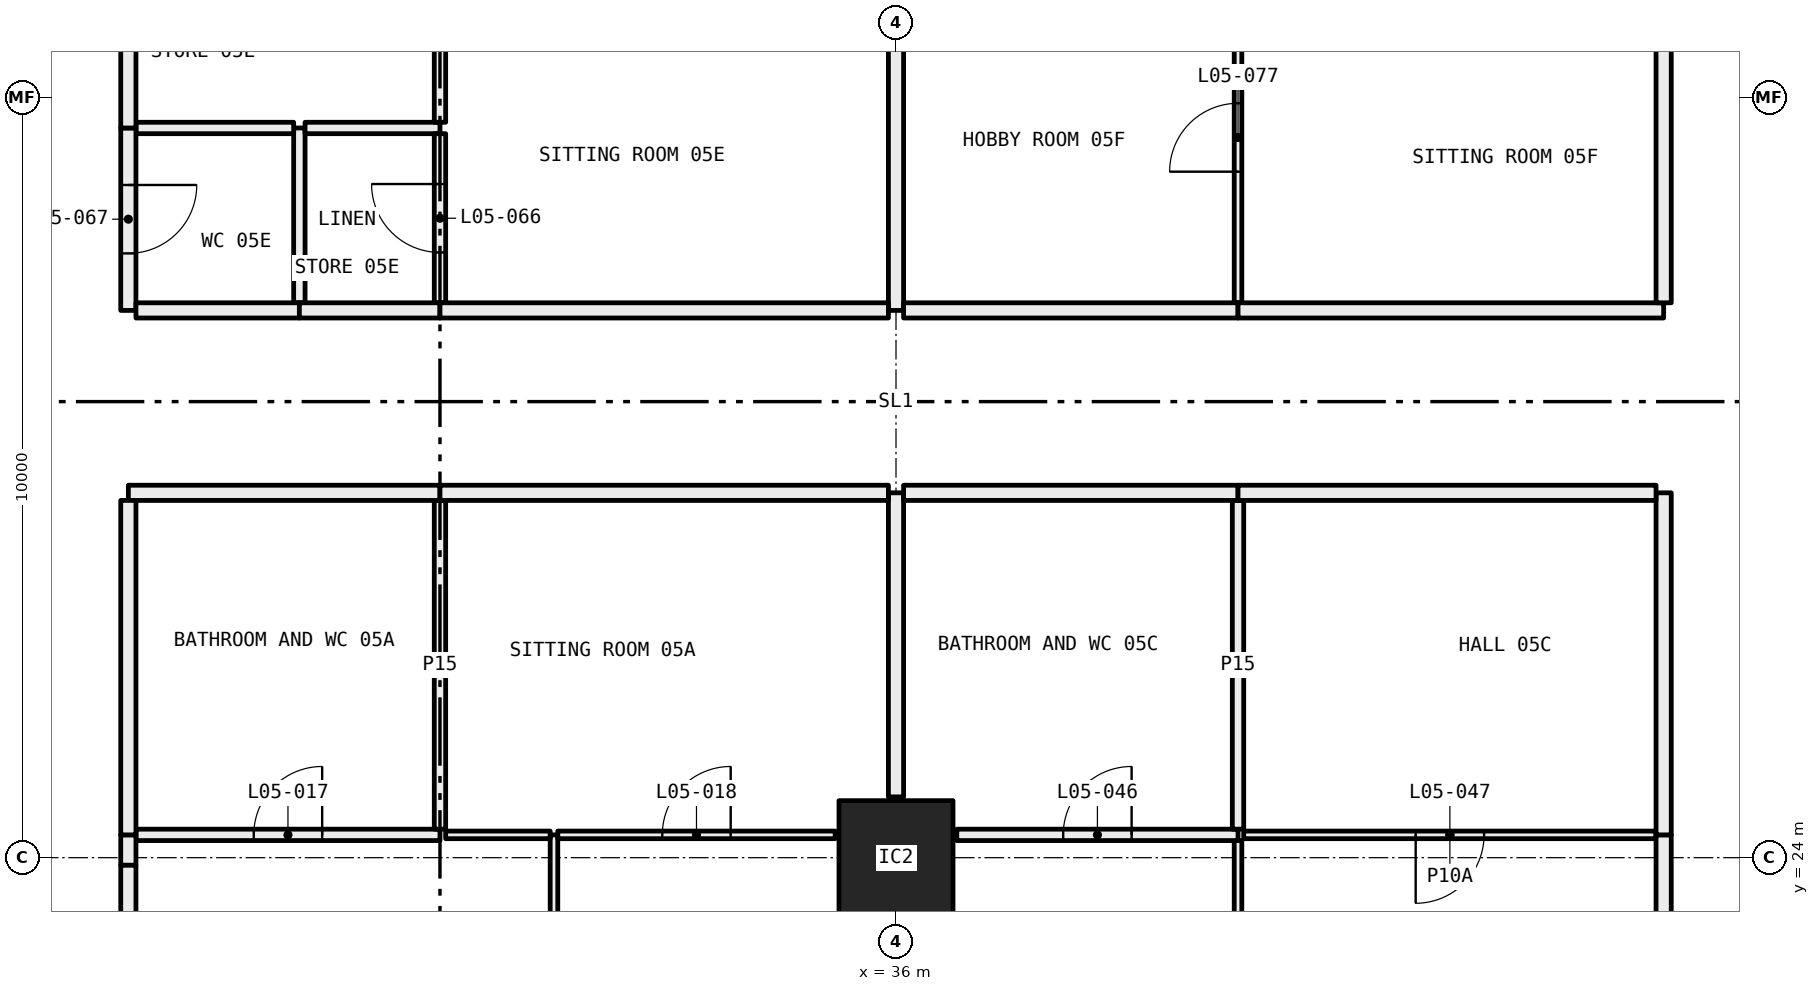
"""IFC4 building model, lengths in metres.
Left out: names, types, materials, properties, quantities, classifications, styles, units other than length and angle.
Written with IfcOpenShell. Run it as: python <this file> out.ifc"""

import sys

from ifc_helpers import new_model, si_unit, direction, frame, frame_2d, origin, origin_2d, place, context, subcontext, project, spatial, rectangle, hollow_rectangle, extrude, element, fill, save


model = new_model("IFC4")
c1 = context("Model", 3, precision=1e-05, world=origin(), true_north=direction((0.0, 1.0)))
c2 = subcontext(c1, "Body", "Model", "MODEL_VIEW")
j1 = project(units=[si_unit("LENGTHUNIT", "METRE"), si_unit("PLANEANGLEUNIT", "RADIAN")], contexts=[c1])
p1 = place(None, origin())
s1 = spatial("IfcSite", under=j1, at=p1, CompositionType="ELEMENT")
p2 = place(p1, origin())
s2 = spatial("IfcBuilding", under=s1, at=p2, CompositionType="ELEMENT")
p3 = place(p2, frame((0.0, 0.0, 30.0)))
s3 = spatial("IfcBuildingStorey", under=s2, at=p3, CompositionType="ELEMENT", Elevation=30.0)
p4 = place(p3, frame((36.0, 24.0, 0.0), z_axis=(0.0, 0.0, 1.0), x_axis=(1.0, 0.0, 0.0)))
e1 = element("IfcColumn", 1, at=p4, inside=s3, PredefinedType="COLUMN", context=c2, shape_type="SweptSolid", body=[
    extrude(hollow_rectangle(XDim=1.5, YDim=1.5, WallThickness=0.065, at=origin_2d()), origin(), (0.0, 0.0, 1.0), 3.05),
])
p5 = place(p3, frame((31.5, 18.05, 0.0), z_axis=(0.0, 0.0, 1.0), x_axis=(0.0, 1.0, 0.0)))
e2 = element("IfcWall", 2, at=p5, inside=s3, PredefinedType="PARTITIONING", context=c2, shape_type="SweptSolid", body=[
    extrude(rectangle(XDim=6.25, YDim=0.1, at=frame_2d((3.125, 0.0))), origin(), (0.0, 0.0, 1.0), 2.45),
])
p6 = place(p5, frame((2.675, 0.0, 0.0)))
e3 = element("IfcOpeningElement", 3, at=p6, cuts=e2, PredefinedType="OPENING", context=c2, shape_type="SweptSolid", body=[
    extrude(rectangle(XDim=0.9, YDim=2.1, at=frame_2d((0.45, 1.05))), frame((0.0, 0.06, 0.0), z_axis=(0.0, -1.0, 0.0), x_axis=(1.0, 0.0, 0.0)), (0.0, 0.0, 1.0), 0.12),
])
p7 = place(p3, frame((30.0, 24.3, 0.0), z_axis=(0.0, 0.0, 1.0), x_axis=(-1.0, 0.0, 0.0)))
e4 = element("IfcWall", 4, at=p7, inside=s3, PredefinedType="PARTITIONING", context=c2, shape_type="SweptSolid", body=[
    extrude(rectangle(XDim=4.0, YDim=0.15, at=frame_2d((2.0, 0.0))), origin(), (0.0, 0.0, 1.0), 3.05),
])
p8 = place(p7, frame((1.55, 0.0, 0.0)))
e5 = element("IfcOpeningElement", 5, at=p8, cuts=e4, PredefinedType="OPENING", context=c2, shape_type="SweptSolid", body=[
    extrude(rectangle(XDim=0.9, YDim=2.1, at=frame_2d((0.45, 1.05))), frame((0.0, 0.085, 0.0), z_axis=(0.0, -1.0, 0.0), x_axis=(1.0, 0.0, 0.0)), (0.0, 0.0, 1.0), 0.17),
])
p9 = place(p3, frame((31.45, 24.3, 0.0), z_axis=(0.0, 0.0, 1.0), x_axis=(-1.0, 0.0, 0.0)))
e6 = element("IfcWall", 6, at=p9, inside=s3, PredefinedType="PARTITIONING", context=c2, shape_type="SweptSolid", body=[
    extrude(rectangle(XDim=1.375, YDim=0.1, at=frame_2d((0.688, 0.0))), origin(), (0.0, 0.0, 1.0), 3.05),
])
p10 = place(p3, frame((25.9, 24.3, 0.0), z_axis=(0.0, 0.0, 1.0), x_axis=(0.0, -1.0, 0.0)))
e7 = element("IfcWall", 7, at=p10, inside=s3, PredefinedType="PARTITIONING", context=c2, shape_type="SweptSolid", body=[
    extrude(rectangle(XDim=0.4, YDim=0.2, at=frame_2d((0.2, 0.0))), origin(), (0.0, 0.0, 1.0), 2.45),
])
p11 = place(p3, frame((25.9, 23.9, 0.0), z_axis=(0.0, 0.0, 1.0), x_axis=(0.0, -1.0, 0.0)))
e8 = element("IfcWall", 8, at=p11, inside=s3, PredefinedType="PARTITIONING", context=c2, shape_type="SweptSolid", body=[
    extrude(rectangle(XDim=5.8, YDim=0.2, at=frame_2d((2.9, 0.0))), origin(), (0.0, 0.0, 1.0), 3.05),
])
p12 = place(p3, frame((35.2, 24.3, 0.0), z_axis=(0.0, 0.0, 1.0), x_axis=(-1.0, 0.0, 0.0)))
e9 = element("IfcWall", 9, at=p12, inside=s3, PredefinedType="PARTITIONING", context=c2, shape_type="SweptSolid", body=[
    extrude(rectangle(XDim=3.65, YDim=0.1, at=frame_2d((1.825, 0.0))), origin(), (0.0, 0.0, 1.0), 3.05),
])
p13 = place(p12, frame((1.375, 0.0, 0.0)))
e10 = element("IfcOpeningElement", 10, at=p13, cuts=e9, PredefinedType="OPENING", context=c2, shape_type="SweptSolid", body=[
    extrude(rectangle(XDim=0.9, YDim=2.1, at=frame_2d((0.45, 1.05))), frame((0.0, 0.06, 0.0), z_axis=(0.0, -1.0, 0.0), x_axis=(1.0, 0.0, 0.0)), (0.0, 0.0, 1.0), 0.12),
])
p14 = place(p3, frame((30.0, 24.375, 0.0), z_axis=(0.0, 0.0, 1.0), x_axis=(0.0, 1.0, 0.0)))
e11 = element("IfcWall", 11, at=p14, inside=s3, PredefinedType="PARTITIONING", context=c2, shape_type="SweptSolid", body=[
    extrude(rectangle(XDim=4.325, YDim=0.15, at=frame_2d((2.163, 0.0))), origin(), (0.0, 0.0, 1.0), 3.05),
])
p15 = place(p3, frame((30.0, 28.8, 0.0), z_axis=(0.0, 0.0, 1.0), x_axis=(-1.0, 0.0, 0.0)))
e12 = element("IfcWall", 12, at=p15, inside=s3, PredefinedType="PARTITIONING", context=c2, shape_type="SweptSolid", body=[
    extrude(rectangle(XDim=4.1, YDim=0.2, at=frame_2d((2.05, 0.0))), origin(), (0.0, 0.0, 1.0), 3.05),
])
p16 = place(p3, frame((25.9, 28.7, 0.0), z_axis=(0.0, 0.0, 1.0), x_axis=(0.0, -1.0, 0.0)))
e13 = element("IfcWall", 13, at=p16, inside=s3, PredefinedType="PARTITIONING", context=c2, shape_type="SweptSolid", body=[
    extrude(rectangle(XDim=4.4, YDim=0.2, at=frame_2d((2.2, 0.0))), origin(), (0.0, 0.0, 1.0), 3.05),
])
p17 = place(p3, frame((36.0, 24.8, 0.0), z_axis=(0.0, 0.0, 1.0), x_axis=(0.0, 1.0, 0.0)))
e14 = element("IfcWall", 14, at=p17, inside=s3, PredefinedType="PARTITIONING", context=c2, shape_type="SweptSolid", body=[
    extrude(rectangle(XDim=4.0, YDim=0.2, at=frame_2d((2.0, 0.0))), origin(), (0.0, 0.0, 1.0), 2.45),
])
p18 = place(p3, frame((35.9, 28.8, 0.0), z_axis=(0.0, 0.0, 1.0), x_axis=(-1.0, 0.0, 0.0)))
e15 = element("IfcWall", 15, at=p18, inside=s3, PredefinedType="PARTITIONING", context=c2, shape_type="SweptSolid", body=[
    extrude(rectangle(XDim=5.9, YDim=0.2, at=frame_2d((2.95, 0.0))), origin(), (0.0, 0.0, 1.0), 3.05),
])
p19 = place(p3, frame((40.5, 18.05, 0.0), z_axis=(0.0, 0.0, 1.0), x_axis=(0.0, 1.0, 0.0)))
e16 = element("IfcWall", 16, at=p19, inside=s3, PredefinedType="PARTITIONING", context=c2, shape_type="SweptSolid", body=[
    extrude(rectangle(XDim=6.175, YDim=0.1, at=frame_2d((3.087, 0.0))), origin(), (0.0, 0.0, 1.0), 2.45),
])
p20 = place(p19, frame((2.637, 0.0, 0.0)))
e17 = element("IfcOpeningElement", 17, at=p20, cuts=e16, PredefinedType="OPENING", context=c2, shape_type="SweptSolid", body=[
    extrude(rectangle(XDim=0.9, YDim=2.1, at=frame_2d((0.45, 1.05))), frame((0.0, 0.06, 0.0), z_axis=(0.0, -1.0, 0.0), x_axis=(1.0, 0.0, 0.0)), (0.0, 0.0, 1.0), 0.12),
])
p21 = place(p3, frame((40.5, 24.3, 0.0), z_axis=(0.0, 0.0, 1.0), x_axis=(-1.0, 0.0, 0.0)))
e18 = element("IfcWall", 18, at=p21, inside=s3, PredefinedType="PARTITIONING", context=c2, shape_type="SweptSolid", body=[
    extrude(rectangle(XDim=3.7, YDim=0.15, at=frame_2d((1.85, 0.0))), origin(), (0.0, 0.0, 1.0), 3.05),
])
p22 = place(p21, frame((1.4, 0.0, 0.0)))
e19 = element("IfcOpeningElement", 19, at=p22, cuts=e18, PredefinedType="OPENING", context=c2, shape_type="SweptSolid", body=[
    extrude(rectangle(XDim=0.9, YDim=2.1, at=frame_2d((0.45, 1.05))), frame((0.0, 0.085, 0.0), z_axis=(0.0, -1.0, 0.0), x_axis=(1.0, 0.0, 0.0)), (0.0, 0.0, 1.0), 0.17),
])
p23 = place(p3, frame((46.0, 24.3, 0.0), z_axis=(0.0, 0.0, 1.0), x_axis=(-1.0, 0.0, 0.0)))
e20 = element("IfcWall", 20, at=p23, inside=s3, PredefinedType="PARTITIONING", context=c2, shape_type="SweptSolid", body=[
    extrude(rectangle(XDim=5.425, YDim=0.1, at=frame_2d((2.712, 0.0))), origin(), (0.0, 0.0, 1.0), 3.05),
])
p24 = place(p23, frame((2.262, 0.0, 0.0)))
e21 = element("IfcOpeningElement", 21, at=p24, cuts=e20, PredefinedType="OPENING", context=c2, shape_type="SweptSolid", body=[
    extrude(rectangle(XDim=0.9, YDim=2.1, at=frame_2d((0.45, 1.05))), frame((0.0, 0.06, 0.0), z_axis=(0.0, -1.0, 0.0), x_axis=(1.0, 0.0, 0.0)), (0.0, 0.0, 1.0), 0.12),
])
p25 = place(p3, frame((46.1, 18.1, 0.0), z_axis=(0.0, 0.0, 1.0), x_axis=(0.0, 1.0, 0.0)))
e22 = element("IfcWall", 22, at=p25, inside=s3, PredefinedType="PARTITIONING", context=c2, shape_type="SweptSolid", body=[
    extrude(rectangle(XDim=6.2, YDim=0.2, at=frame_2d((3.1, 0.0))), origin(), (0.0, 0.0, 1.0), 2.45),
])
p26 = place(p3, frame((40.5, 24.375, 0.0), z_axis=(0.0, 0.0, 1.0), x_axis=(0.0, 1.0, 0.0)))
e23 = element("IfcWall", 23, at=p26, inside=s3, PredefinedType="PARTITIONING", context=c2, shape_type="SweptSolid", body=[
    extrude(rectangle(XDim=4.325, YDim=0.15, at=frame_2d((2.163, 0.0))), origin(), (0.0, 0.0, 1.0), 3.05),
])
p27 = place(p3, frame((40.5, 28.8, 0.0), z_axis=(0.0, 0.0, 1.0), x_axis=(-1.0, 0.0, 0.0)))
e24 = element("IfcWall", 24, at=p27, inside=s3, PredefinedType="PARTITIONING", context=c2, shape_type="SweptSolid", body=[
    extrude(rectangle(XDim=4.4, YDim=0.2, at=frame_2d((2.2, 0.0))), origin(), (0.0, 0.0, 1.0), 3.05),
])
p28 = place(p3, frame((46.1, 24.3, 0.0), z_axis=(0.0, 0.0, 1.0), x_axis=(0.0, 1.0, 0.0)))
e25 = element("IfcWall", 25, at=p28, inside=s3, PredefinedType="PARTITIONING", context=c2, shape_type="SweptSolid", body=[
    extrude(rectangle(XDim=4.5, YDim=0.2, at=frame_2d((2.25, 0.0))), origin(), (0.0, 0.0, 1.0), 3.05),
])
p29 = place(p3, frame((46.0, 28.8, 0.0), z_axis=(0.0, 0.0, 1.0), x_axis=(-1.0, 0.0, 0.0)))
e26 = element("IfcWall", 26, at=p29, inside=s3, PredefinedType="PARTITIONING", context=c2, shape_type="SweptSolid", body=[
    extrude(rectangle(XDim=5.5, YDim=0.2, at=frame_2d((2.75, 0.0))), origin(), (0.0, 0.0, 1.0), 3.05),
])
p30 = place(p3, frame((28.15, 31.3, 0.0), z_axis=(0.0, 0.0, 1.0), x_axis=(0.0, 1.0, 0.0)))
e27 = element("IfcWall", 27, at=p30, inside=s3, PredefinedType="PARTITIONING", context=c2, shape_type="SweptSolid", body=[
    extrude(rectangle(XDim=2.3, YDim=0.15, at=frame_2d((1.15, 0.0))), origin(), (0.0, 0.0, 1.0), 3.05),
])
p31 = place(p3, frame((28.075, 33.6, 0.0), z_axis=(0.0, 0.0, 1.0), x_axis=(-1.0, 0.0, 0.0)))
e28 = element("IfcWall", 28, at=p31, inside=s3, PredefinedType="PARTITIONING", context=c2, shape_type="SweptSolid", body=[
    extrude(rectangle(XDim=2.075, YDim=0.15, at=frame_2d((1.038, 0.0))), origin(), (0.0, 0.0, 1.0), 3.05),
])
p32 = place(p3, frame((25.9, 33.6, 0.0), z_axis=(0.0, 0.0, 1.0), x_axis=(0.0, -1.0, 0.0)))
e29 = element("IfcWall", 29, at=p32, inside=s3, PredefinedType="PARTITIONING", context=c2, shape_type="SweptSolid", body=[
    extrude(rectangle(XDim=2.4, YDim=0.2, at=frame_2d((1.2, 0.0))), origin(), (0.0, 0.0, 1.0), 3.05),
])
p33 = place(p32, frame((0.75, 0.0, 0.0)))
e30 = element("IfcOpeningElement", 30, at=p33, cuts=e29, PredefinedType="OPENING", context=c2, shape_type="SweptSolid", body=[
    extrude(rectangle(XDim=0.9, YDim=2.1, at=frame_2d((0.45, 1.05))), frame((0.0, 0.11, 0.0), z_axis=(0.0, -1.0, 0.0), x_axis=(1.0, 0.0, 0.0)), (0.0, 0.0, 1.0), 0.22),
])
p34 = place(p3, frame((26.0, 31.2, 0.0), z_axis=(0.0, 0.0, 1.0), x_axis=(1.0, 0.0, 0.0)))
e31 = element("IfcWall", 31, at=p34, inside=s3, PredefinedType="PARTITIONING", context=c2, shape_type="SweptSolid", body=[
    extrude(rectangle(XDim=2.15, YDim=0.2, at=frame_2d((1.075, 0.0))), origin(), (0.0, 0.0, 1.0), 3.05),
])
p35 = place(p3, frame((30.0, 33.6, 0.0), z_axis=(0.0, 0.0, 1.0), x_axis=(-1.0, 0.0, 0.0)))
e32 = element("IfcWall", 32, at=p35, inside=s3, PredefinedType="PARTITIONING", context=c2, shape_type="SweptSolid", body=[
    extrude(rectangle(XDim=1.775, YDim=0.15, at=frame_2d((0.887, 0.0))), origin(), (0.0, 0.0, 1.0), 3.05),
])
p36 = place(p3, frame((30.0, 31.3, 0.0), z_axis=(0.0, 0.0, 1.0), x_axis=(0.0, 1.0, 0.0)))
e33 = element("IfcWall", 33, at=p36, inside=s3, PredefinedType="PARTITIONING", context=c2, shape_type="SweptSolid", body=[
    extrude(rectangle(XDim=2.225, YDim=0.15, at=frame_2d((1.112, 0.0))), origin(), (0.0, 0.0, 1.0), 3.05),
])
p37 = place(p36, frame((0.663, 0.0, 0.0)))
e34 = element("IfcOpeningElement", 34, at=p37, cuts=e33, PredefinedType="OPENING", context=c2, shape_type="SweptSolid", body=[
    extrude(rectangle(XDim=0.9, YDim=2.1, at=frame_2d((0.45, 1.05))), frame((0.0, 0.085, 0.0), z_axis=(0.0, -1.0, 0.0), x_axis=(1.0, 0.0, 0.0)), (0.0, 0.0, 1.0), 0.17),
])
p38 = place(p3, frame((28.15, 31.2, 0.0), z_axis=(0.0, 0.0, 1.0), x_axis=(1.0, 0.0, 0.0)))
e35 = element("IfcWall", 35, at=p38, inside=s3, PredefinedType="PARTITIONING", context=c2, shape_type="SweptSolid", body=[
    extrude(rectangle(XDim=1.85, YDim=0.2, at=frame_2d((0.925, 0.0))), origin(), (0.0, 0.0, 1.0), 3.05),
])
p39 = place(p3, frame((30.0, 33.675, 0.0), z_axis=(0.0, 0.0, 1.0), x_axis=(0.0, 1.0, 0.0)))
e36 = element("IfcWall", 36, at=p39, inside=s3, PredefinedType="PARTITIONING", context=c2, shape_type="SweptSolid", body=[
    extrude(rectangle(XDim=1.95, YDim=0.15, at=frame_2d((0.975, 0.0))), origin(), (0.0, 0.0, 1.0), 3.05),
])
p40 = place(p3, frame((25.9, 35.7, 0.0), z_axis=(0.0, 0.0, 1.0), x_axis=(0.0, -1.0, 0.0)))
e37 = element("IfcWall", 37, at=p40, inside=s3, PredefinedType="PARTITIONING", context=c2, shape_type="SweptSolid", body=[
    extrude(rectangle(XDim=2.1, YDim=0.2, at=frame_2d((1.05, 0.0))), origin(), (0.0, 0.0, 1.0), 3.05),
])
p41 = place(p3, frame((36.0, 31.2, 0.0), z_axis=(0.0, 0.0, 1.0), x_axis=(0.0, 1.0, 0.0)))
e38 = element("IfcWall", 38, at=p41, inside=s3, PredefinedType="PARTITIONING", context=c2, shape_type="SweptSolid", body=[
    extrude(rectangle(XDim=4.0, YDim=0.2, at=frame_2d((2.0, 0.0))), origin(), (0.0, 0.0, 1.0), 2.45),
])
p42 = place(p3, frame((30.0, 31.2, 0.0), z_axis=(0.0, 0.0, 1.0), x_axis=(1.0, 0.0, 0.0)))
e39 = element("IfcWall", 39, at=p42, inside=s3, PredefinedType="PARTITIONING", context=c2, shape_type="SweptSolid", body=[
    extrude(rectangle(XDim=5.9, YDim=0.2, at=frame_2d((2.95, 0.0))), origin(), (0.0, 0.0, 1.0), 3.05),
])
p43 = place(p3, frame((40.5, 31.3, 0.0), z_axis=(0.0, 0.0, 1.0), x_axis=(0.0, 1.0, 0.0)))
e40 = element("IfcWall", 40, at=p43, inside=s3, PredefinedType="PARTITIONING", context=c2, shape_type="SweptSolid", body=[
    extrude(rectangle(XDim=4.35, YDim=0.1, at=frame_2d((2.175, 0.0))), origin(), (0.0, 0.0, 1.0), 3.05),
])
p44 = place(p43, frame((1.725, 0.0, 0.0)))
e41 = element("IfcOpeningElement", 41, at=p44, cuts=e40, PredefinedType="OPENING", context=c2, shape_type="SweptSolid", body=[
    extrude(rectangle(XDim=0.9, YDim=2.1, at=frame_2d((0.45, 1.05))), frame((0.0, 0.06, 0.0), z_axis=(0.0, -1.0, 0.0), x_axis=(1.0, 0.0, 0.0)), (0.0, 0.0, 1.0), 0.12),
])
p45 = place(p3, frame((36.1, 31.2, 0.0), z_axis=(0.0, 0.0, 1.0), x_axis=(1.0, 0.0, 0.0)))
e42 = element("IfcWall", 42, at=p45, inside=s3, PredefinedType="PARTITIONING", context=c2, shape_type="SweptSolid", body=[
    extrude(rectangle(XDim=4.4, YDim=0.2, at=frame_2d((2.2, 0.0))), origin(), (0.0, 0.0, 1.0), 3.05),
])
p46 = place(p3, frame((40.5, 31.2, 0.0), z_axis=(0.0, 0.0, 1.0), x_axis=(1.0, 0.0, 0.0)))
e43 = element("IfcWall", 43, at=p46, inside=s3, PredefinedType="PARTITIONING", context=c2, shape_type="SweptSolid", body=[
    extrude(rectangle(XDim=5.6, YDim=0.2, at=frame_2d((2.8, 0.0))), origin(), (0.0, 0.0, 1.0), 3.05),
])
p47 = place(p3, frame((46.1, 31.3, 0.0), z_axis=(0.0, 0.0, 1.0), x_axis=(0.0, 1.0, 0.0)))
e44 = element("IfcWall", 44, at=p47, inside=s3, PredefinedType="PARTITIONING", context=c2, shape_type="SweptSolid", body=[
    extrude(rectangle(XDim=4.4, YDim=0.2, at=frame_2d((2.2, 0.0))), origin(), (0.0, 0.0, 1.0), 3.05),
])
p48 = place(p8, frame((0.9, 0.0, 0.0), x_axis=(-1.0, 0.0, 0.0)))
e45 = element("IfcDoor", 45, at=p48, inside=s3, OperationType="SINGLE_SWING_LEFT", PredefinedType="DOOR", context=c2, shape_type="SweptSolid", body=[
    extrude(rectangle(XDim=0.9, YDim=2.1, at=frame_2d((0.45, 1.05))), frame((0.0, 0.025, 0.0), z_axis=(0.0, -1.0, 0.0), x_axis=(1.0, 0.0, 0.0)), (0.0, 0.0, 1.0), 0.05),
])
fill(e5, e45)
p49 = place(p13, frame((0.9, 0.0, 0.0), x_axis=(-1.0, 0.0, 0.0)))
e46 = element("IfcDoor", 46, at=p49, inside=s3, OperationType="SINGLE_SWING_LEFT", PredefinedType="DOOR", context=c2, shape_type="SweptSolid", body=[
    extrude(rectangle(XDim=0.9, YDim=2.1, at=frame_2d((0.45, 1.05))), frame((0.0, 0.025, 0.0), z_axis=(0.0, -1.0, 0.0), x_axis=(1.0, 0.0, 0.0)), (0.0, 0.0, 1.0), 0.05),
])
fill(e10, e46)
p50 = place(p22, frame((0.9, 0.0, 0.0), x_axis=(-1.0, 0.0, 0.0)))
e47 = element("IfcDoor", 47, at=p50, inside=s3, OperationType="SINGLE_SWING_LEFT", PredefinedType="DOOR", context=c2, shape_type="SweptSolid", body=[
    extrude(rectangle(XDim=0.9, YDim=2.1, at=frame_2d((0.45, 1.05))), frame((0.0, 0.025, 0.0), z_axis=(0.0, -1.0, 0.0), x_axis=(1.0, 0.0, 0.0)), (0.0, 0.0, 1.0), 0.05),
])
fill(e19, e47)
p51 = place(p24, origin())
e48 = element("IfcDoor", 48, at=p51, inside=s3, OperationType="SINGLE_SWING_LEFT", PredefinedType="DOOR", context=c2, shape_type="SweptSolid", body=[
    extrude(rectangle(XDim=0.9, YDim=2.1, at=frame_2d((0.45, 1.05))), frame((0.0, 0.025, 0.0), z_axis=(0.0, -1.0, 0.0), x_axis=(1.0, 0.0, 0.0)), (0.0, 0.0, 1.0), 0.05),
])
fill(e21, e48)
p52 = place(p37, origin())
e49 = element("IfcDoor", 49, at=p52, inside=s3, OperationType="SINGLE_SWING_LEFT", PredefinedType="DOOR", context=c2, shape_type="SweptSolid", body=[
    extrude(rectangle(XDim=0.9, YDim=2.1, at=frame_2d((0.45, 1.05))), frame((0.0, 0.025, 0.0), z_axis=(0.0, -1.0, 0.0), x_axis=(1.0, 0.0, 0.0)), (0.0, 0.0, 1.0), 0.05),
])
fill(e34, e49)
p53 = place(p33, origin())
e50 = element("IfcDoor", 50, at=p53, inside=s3, OperationType="SINGLE_SWING_RIGHT", PredefinedType="DOOR", context=c2, shape_type="SweptSolid", body=[
    extrude(rectangle(XDim=0.9, YDim=2.1, at=frame_2d((0.45, 1.05))), frame((0.0, 0.025, 0.0), z_axis=(0.0, -1.0, 0.0), x_axis=(1.0, 0.0, 0.0)), (0.0, 0.0, 1.0), 0.05),
])
fill(e30, e50)
p54 = place(p44, origin())
e51 = element("IfcDoor", 51, at=p54, inside=s3, OperationType="SINGLE_SWING_RIGHT", PredefinedType="DOOR", context=c2, shape_type="SweptSolid", body=[
    extrude(rectangle(XDim=0.9, YDim=2.1, at=frame_2d((0.45, 1.05))), frame((0.0, 0.025, 0.0), z_axis=(0.0, -1.0, 0.0), x_axis=(1.0, 0.0, 0.0)), (0.0, 0.0, 1.0), 0.05),
])
fill(e41, e51)
save(model, sys.argv[1])
